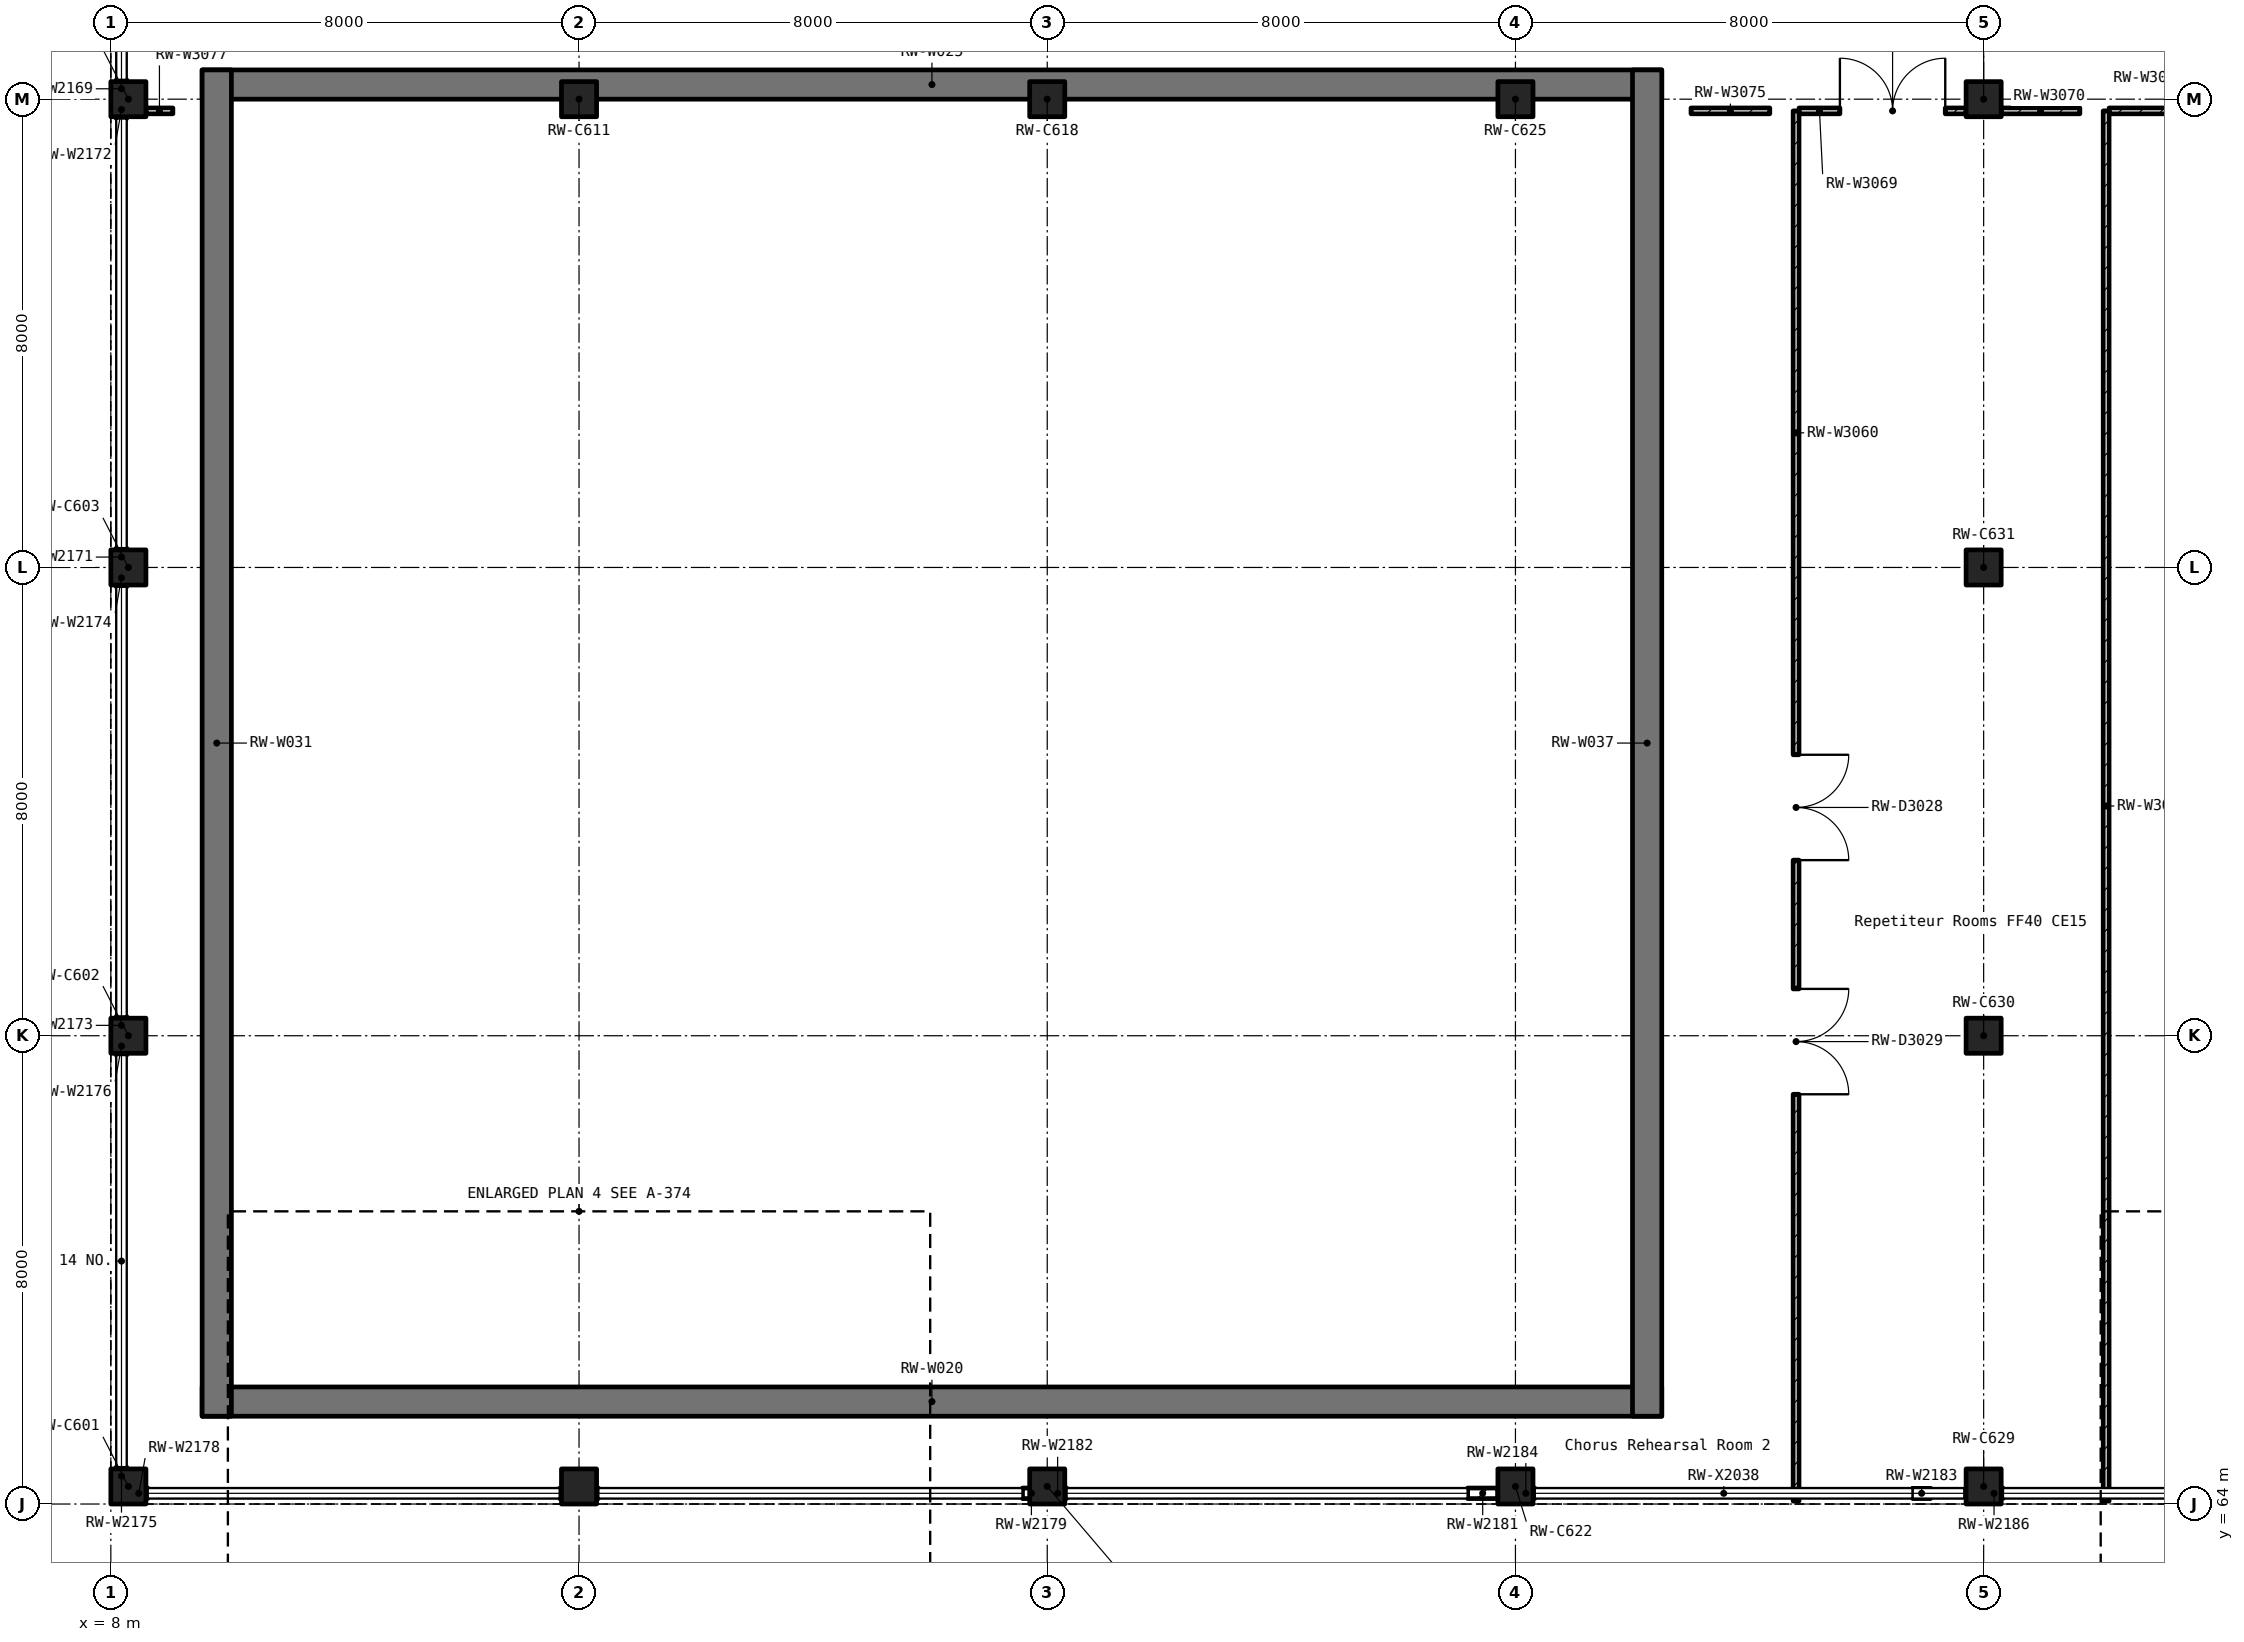
"""IFC4 building model, lengths in metres.
Left out: names, types, materials, properties, quantities, classifications, styles, units other than length and angle.
Written with IfcOpenShell. Run it as: python <this file> out.ifc"""

import sys

from ifc_helpers import new_model, si_unit, direction, frame, frame_2d, origin, origin_2d, place, context, subcontext, project, spatial, rectangle, extrude, element, fill, save


model = new_model("IFC4")
c1 = context("Model", 3, precision=1e-05, world=origin(), true_north=direction((0.0, 1.0)))
c2 = subcontext(c1, "Body", "Model", "MODEL_VIEW")
j1 = project(units=[si_unit("LENGTHUNIT", "METRE"), si_unit("PLANEANGLEUNIT", "RADIAN")], contexts=[c1])
p1 = place(None, origin())
s1 = spatial("IfcSite", under=j1, at=p1, CompositionType="ELEMENT")
p2 = place(p1, origin())
s2 = spatial("IfcBuilding", under=s1, at=p2, CompositionType="ELEMENT")
p3 = place(p2, frame((0.0, 0.0, 11.5)))
s3 = spatial("IfcBuildingStorey", under=s2, at=p3, CompositionType="ELEMENT", Elevation=11.5)
for number, where, z_axis, x_axis in (
    (1, (8.3, 64.3, 0.0), (0.0, 0.0, 1.0), (1.0, 0.0, 0.0)),
    (2, (8.3, 72.0, 0.0), (0.0, 0.0, 1.0), (1.0, 0.0, 0.0)),
    (3, (8.3, 80.0, 0.0), (0.0, 0.0, 1.0), (1.0, 0.0, 0.0)),
    (4, (8.3, 88.0, 0.0), (0.0, 0.0, 1.0), (1.0, 0.0, 0.0)),
    (5, (16.0, 64.3, 0.0), (0.0, 0.0, 1.0), (1.0, 0.0, 0.0)),
    (6, (16.0, 88.0, 0.0), (0.0, 0.0, 1.0), (1.0, 0.0, 0.0)),
    (7, (24.0, 64.3, 0.0), (0.0, 0.0, 1.0), (1.0, 0.0, 0.0)),
    (8, (24.0, 88.0, 0.0), (0.0, 0.0, 1.0), (1.0, 0.0, 0.0)),
    (9, (32.0, 64.3, 0.0), (0.0, 0.0, 1.0), (1.0, 0.0, 0.0)),
    (10, (32.0, 88.0, 0.0), (0.0, 0.0, 1.0), (1.0, 0.0, 0.0)),
    (11, (40.0, 64.3, 0.0), (0.0, 0.0, 1.0), (1.0, 0.0, 0.0)),
    (12, (40.0, 72.0, 0.0), (0.0, 0.0, 1.0), (1.0, 0.0, 0.0)),
    (13, (40.0, 80.0, 0.0), (0.0, 0.0, 1.0), (1.0, 0.0, 0.0)),
    (14, (40.0, 88.0, 0.0), (0.0, 0.0, 1.0), (1.0, 0.0, 0.0)),
):
    element("IfcColumn", number, at=place(p3, frame(where, z_axis=z_axis, x_axis=x_axis)), inside=s3, PredefinedType="COLUMN", context=c2, shape_type="SweptSolid", body=[
        extrude(rectangle(XDim=0.6, YDim=0.6, at=origin_2d()), origin(), (0.0, 0.0, 1.0), 5.5),
    ])
for number, where, z_axis, x_axis in (
    (15, (9.56, 65.75, 0.0), (0.0, 0.0, 1.0), (1.0, 0.0, 0.0)),
    (16, (9.56, 88.25, 0.0), (0.0, 0.0, 1.0), (1.0, 0.0, 0.0)),
):
    element("IfcWall", number, at=place(p3, frame(where, z_axis=z_axis, x_axis=x_axis)), inside=s3, PredefinedType="SHEAR", context=c2, shape_type="SweptSolid", body=[
        extrude(rectangle(XDim=24.94, YDim=0.5, at=frame_2d((12.47, 0.0))), origin(), (0.0, 0.0, 1.0), 5.5),
    ])
for number, where, z_axis, x_axis in (
    (17, (9.81, 65.5, 0.0), (0.0, 0.0, 1.0), (0.0, 1.0, 0.0)),
    (18, (34.25, 65.5, 0.0), (0.0, 0.0, 1.0), (0.0, 1.0, 0.0)),
):
    element("IfcWall", number, at=place(p3, frame(where, z_axis=z_axis, x_axis=x_axis)), inside=s3, PredefinedType="SHEAR", context=c2, shape_type="SweptSolid", body=[
        extrude(rectangle(XDim=23.0, YDim=0.5, at=frame_2d((11.5, 0.0))), origin(), (0.0, 0.0, 1.0), 5.5),
    ])
p4 = place(p3, frame((36.795, 87.8, 0.0), z_axis=(0.0, 0.0, 1.0), x_axis=(0.0, -1.0, 0.0)))
e19 = element("IfcWall", 19, at=p4, inside=s3, PredefinedType="PARTITIONING", context=c2, shape_type="SweptSolid", body=[
    extrude(rectangle(XDim=23.75, YDim=0.1, at=frame_2d((11.875, 0.0))), origin(), (0.0, 0.0, 1.0), 4.45),
])
p5 = place(p4, frame((11.0, 0.0, 0.0)))
e20 = element("IfcOpeningElement", 20, at=p5, cuts=e19, PredefinedType="OPENING", context=c2, shape_type="SweptSolid", body=[
    extrude(rectangle(XDim=1.8, YDim=2.1, at=frame_2d((0.9, 1.05))), frame((0.0, 0.062, 0.0), z_axis=(0.0, -1.0, 0.0), x_axis=(1.0, 0.0, 0.0)), (0.0, 0.0, 1.0), 0.124),
])
p6 = place(p4, frame((15.0, 0.0, 0.0)))
e21 = element("IfcOpeningElement", 21, at=p6, cuts=e19, PredefinedType="OPENING", context=c2, shape_type="SweptSolid", body=[
    extrude(rectangle(XDim=1.8, YDim=2.1, at=frame_2d((0.9, 1.05))), frame((0.0, 0.062, 0.0), z_axis=(0.0, -1.0, 0.0), x_axis=(1.0, 0.0, 0.0)), (0.0, 0.0, 1.0), 0.124),
])
p7 = place(p3, frame((42.093, 87.8, 0.0), z_axis=(0.0, 0.0, 1.0), x_axis=(0.0, -1.0, 0.0)))
e22 = element("IfcWall", 22, at=p7, inside=s3, PredefinedType="PARTITIONING", context=c2, shape_type="SweptSolid", body=[
    extrude(rectangle(XDim=23.75, YDim=0.1, at=frame_2d((11.875, 0.0))), origin(), (0.0, 0.0, 1.0), 4.45),
])
p8 = place(p3, frame((42.144, 87.8, 0.0), z_axis=(0.0, 0.0, 1.0), x_axis=(1.0, 0.0, 0.0)))
e23 = element("IfcWall", 23, at=p8, inside=s3, PredefinedType="PARTITIONING", context=c2, shape_type="SweptSolid", body=[
    extrude(rectangle(XDim=5.556, YDim=0.1, at=frame_2d((2.778, 0.0))), origin(), (0.0, 0.0, 1.0), 4.45),
])
p9 = place(p8, frame((2.503, 0.0, 0.0)))
e24 = element("IfcOpeningElement", 24, at=p9, cuts=e23, PredefinedType="OPENING", context=c2, shape_type="SweptSolid", body=[
    extrude(rectangle(XDim=1.8, YDim=2.1, at=frame_2d((0.9, 1.05))), frame((0.0, 0.062, 0.0), z_axis=(0.0, -1.0, 0.0), x_axis=(1.0, 0.0, 0.0)), (0.0, 0.0, 1.0), 0.124),
])
p10 = place(p3, frame((36.846, 87.8, 0.0), z_axis=(0.0, 0.0, 1.0), x_axis=(1.0, 0.0, 0.0)))
e25 = element("IfcWall", 25, at=p10, inside=s3, PredefinedType="PARTITIONING", context=c2, shape_type="SweptSolid", body=[
    extrude(rectangle(XDim=2.854, YDim=0.1, at=frame_2d((1.427, 0.0))), origin(), (0.0, 0.0, 1.0), 4.45),
])
p11 = place(p10, frame((0.698, 0.0, 0.0)))
e26 = element("IfcOpeningElement", 26, at=p11, cuts=e25, PredefinedType="OPENING", context=c2, shape_type="SweptSolid", body=[
    extrude(rectangle(XDim=1.8, YDim=2.1, at=frame_2d((0.9, 1.05))), frame((0.0, 0.062, 0.0), z_axis=(0.0, -1.0, 0.0), x_axis=(1.0, 0.0, 0.0)), (0.0, 0.0, 1.0), 0.124),
])
p12 = place(p3, frame((40.3, 87.8, 0.0), z_axis=(0.0, 0.0, 1.0), x_axis=(1.0, 0.0, 0.0)))
e27 = element("IfcWall", 27, at=p12, inside=s3, PredefinedType="PARTITIONING", context=c2, shape_type="SweptSolid", body=[
    extrude(rectangle(XDim=1.344, YDim=0.1, at=frame_2d((0.672, 0.0))), origin(), (0.0, 0.0, 1.0), 4.45),
])
p13 = place(p3, frame((35.0, 87.8, 0.0), z_axis=(0.0, 0.0, 1.0), x_axis=(1.0, 0.0, 0.0)))
e28 = element("IfcWall", 28, at=p13, inside=s3, PredefinedType="PARTITIONING", context=c2, shape_type="SweptSolid", body=[
    extrude(rectangle(XDim=1.346, YDim=0.1, at=frame_2d((0.673, 0.0))), origin(), (0.0, 0.0, 1.0), 4.45),
])
p14 = place(p3, frame((8.601, 87.8, 0.0), z_axis=(0.0, 0.0, 1.0), x_axis=(1.0, 0.0, 0.0)))
e29 = element("IfcWall", 29, at=p14, inside=s3, PredefinedType="PARTITIONING", context=c2, shape_type="SweptSolid", body=[
    extrude(rectangle(XDim=0.459, YDim=0.1, at=frame_2d((0.229, 0.0))), origin(), (0.0, 0.0, 1.0), 4.45),
])
for number, where, z_axis, x_axis in (
    (30, (8.182, 88.33, 0.0), (0.0, 0.0, 1.0), (0.0, -1.0, 0.0)),
    (31, (8.182, 80.33, 0.0), (0.0, 0.0, 1.0), (0.0, -1.0, 0.0)),
    (32, (8.182, 87.67, 0.0), (0.0, 0.0, 1.0), (0.0, 1.0, 0.0)),
    (33, (8.182, 72.33, 0.0), (0.0, 0.0, 1.0), (0.0, -1.0, 0.0)),
    (34, (8.182, 79.67, 0.0), (0.0, 0.0, 1.0), (0.0, 1.0, 0.0)),
):
    element("IfcWall", number, at=place(p3, frame(where, z_axis=z_axis, x_axis=x_axis)), inside=s3, PredefinedType="SOLIDWALL", context=c2, shape_type="SweptSolid", body=[
        extrude(rectangle(XDim=0.305, YDim=0.18, at=frame_2d((0.153, 0.0))), origin(), (0.0, 0.0, 1.0), 3.7),
    ])
p15 = place(p3, frame((8.182, 64.63, 0.0), z_axis=(0.0, 0.0, 1.0), x_axis=(0.0, -1.0, 0.0)))
e35 = element("IfcWall", 35, at=p15, inside=s3, PredefinedType="SOLIDWALL", context=c2, shape_type="SweptSolid", body=[
    extrude(rectangle(XDim=0.305, YDim=0.18, at=frame_2d((0.152, 0.0))), origin(), (0.0, 0.0, 1.0), 3.7),
])
for number, where, z_axis, x_axis in (
    (36, (8.182, 71.67, 0.0), (0.0, 0.0, 1.0), (0.0, 1.0, 0.0)),
    (37, (15.67, 64.183, 0.0), (0.0, 0.0, 1.0), (1.0, 0.0, 0.0)),
):
    element("IfcWall", number, at=place(p3, frame(where, z_axis=z_axis, x_axis=x_axis)), inside=s3, PredefinedType="SOLIDWALL", context=c2, shape_type="SweptSolid", body=[
        extrude(rectangle(XDim=0.305, YDim=0.18, at=frame_2d((0.153, 0.0))), origin(), (0.0, 0.0, 1.0), 3.7),
    ])
p16 = place(p3, frame((8.63, 64.183, 0.0), z_axis=(0.0, 0.0, 1.0), x_axis=(-1.0, 0.0, 0.0)))
e38 = element("IfcWall", 38, at=p16, inside=s3, PredefinedType="SOLIDWALL", context=c2, shape_type="SweptSolid", body=[
    extrude(rectangle(XDim=0.305, YDim=0.18, at=frame_2d((0.152, 0.0))), origin(), (0.0, 0.0, 1.0), 3.7),
])
for number, where, z_axis, x_axis in (
    (39, (23.577, 64.183, 0.0), (0.0, 0.0, 1.0), (1.0, 0.0, 0.0)),
    (40, (16.33, 64.183, 0.0), (0.0, 0.0, 1.0), (-1.0, 0.0, 0.0)),
):
    element("IfcWall", number, at=place(p3, frame(where, z_axis=z_axis, x_axis=x_axis)), inside=s3, PredefinedType="SOLIDWALL", context=c2, shape_type="SweptSolid", body=[
        extrude(rectangle(XDim=0.305, YDim=0.18, at=frame_2d((0.153, 0.0))), origin(), (0.0, 0.0, 1.0), 3.7),
    ])
p17 = place(p3, frame((31.183, 64.183, 0.0), z_axis=(0.0, 0.0, 1.0), x_axis=(1.0, 0.0, 0.0)))
e41 = element("IfcWall", 41, at=p17, inside=s3, PredefinedType="SOLIDWALL", context=c2, shape_type="SweptSolid", body=[
    extrude(rectangle(XDim=0.515, YDim=0.18, at=frame_2d((0.257, 0.0))), origin(), (0.0, 0.0, 1.0), 3.7),
])
p18 = place(p3, frame((24.33, 64.183, 0.0), z_axis=(0.0, 0.0, 1.0), x_axis=(-1.0, 0.0, 0.0)))
e42 = element("IfcWall", 42, at=p18, inside=s3, PredefinedType="SOLIDWALL", context=c2, shape_type="SweptSolid", body=[
    extrude(rectangle(XDim=0.305, YDim=0.18, at=frame_2d((0.153, 0.0))), origin(), (0.0, 0.0, 1.0), 3.7),
])
p19 = place(p3, frame((38.788, 64.183, 0.0), z_axis=(0.0, 0.0, 1.0), x_axis=(1.0, 0.0, 0.0)))
e43 = element("IfcWall", 43, at=p19, inside=s3, PredefinedType="SOLIDWALL", context=c2, shape_type="SweptSolid", body=[
    extrude(rectangle(XDim=0.305, YDim=0.18, at=frame_2d((0.152, 0.0))), origin(), (0.0, 0.0, 1.0), 3.7),
])
for number, where, z_axis, x_axis in (
    (44, (32.33, 64.183, 0.0), (0.0, 0.0, 1.0), (-1.0, 0.0, 0.0)),
    (45, (40.33, 64.183, 0.0), (0.0, 0.0, 1.0), (-1.0, 0.0, 0.0)),
):
    element("IfcWall", number, at=place(p3, frame(where, z_axis=z_axis, x_axis=x_axis)), inside=s3, PredefinedType="SOLIDWALL", context=c2, shape_type="SweptSolid", body=[
        extrude(rectangle(XDim=0.305, YDim=0.18, at=frame_2d((0.153, 0.0))), origin(), (0.0, 0.0, 1.0), 3.7),
    ])
p20 = place(p5, origin())
e46 = element("IfcDoor", 46, at=p20, inside=s3, OperationType="DOUBLE_DOOR_SINGLE_SWING", PredefinedType="DOOR", context=c2, shape_type="SweptSolid", body=[
    extrude(rectangle(XDim=1.8, YDim=2.1, at=frame_2d((0.9, 1.05))), frame((0.0, 0.025, 0.0), z_axis=(0.0, -1.0, 0.0), x_axis=(1.0, 0.0, 0.0)), (0.0, 0.0, 1.0), 0.05),
])
fill(e20, e46)
p21 = place(p6, origin())
e47 = element("IfcDoor", 47, at=p21, inside=s3, OperationType="DOUBLE_DOOR_SINGLE_SWING", PredefinedType="DOOR", context=c2, shape_type="SweptSolid", body=[
    extrude(rectangle(XDim=1.8, YDim=2.1, at=frame_2d((0.9, 1.05))), frame((0.0, 0.025, 0.0), z_axis=(0.0, -1.0, 0.0), x_axis=(1.0, 0.0, 0.0)), (0.0, 0.0, 1.0), 0.05),
])
fill(e21, e47)
p22 = place(p11, origin())
e48 = element("IfcDoor", 48, at=p22, inside=s3, OperationType="DOUBLE_DOOR_SINGLE_SWING", PredefinedType="DOOR", context=c2, shape_type="SweptSolid", body=[
    extrude(rectangle(XDim=1.8, YDim=2.1, at=frame_2d((0.9, 1.05))), frame((0.0, 0.025, 0.0), z_axis=(0.0, -1.0, 0.0), x_axis=(1.0, 0.0, 0.0)), (0.0, 0.0, 1.0), 0.05),
])
fill(e26, e48)
save(model, sys.argv[1])
